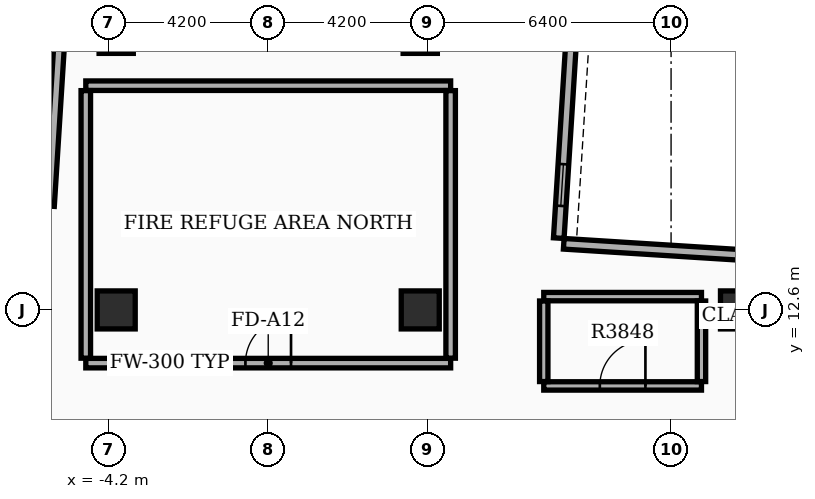
"""IFC4 building model, lengths in metres.
Left out: names, types, materials, properties, quantities, classifications, styles, units other than length and angle.
Written with IfcOpenShell. Run it as: python <this file> out.ifc"""

import sys

from ifc_helpers import new_model, si_unit, direction, frame, frame_2d, origin, origin_2d, place, context, subcontext, project, spatial, rectangle, extrude, element, fill, save


model = new_model("IFC4")
c1 = context("Model", 3, precision=1e-05, world=origin(), true_north=direction((0.0, 1.0)))
c2 = subcontext(c1, "Body", "Model", "MODEL_VIEW")
j1 = project(units=[si_unit("LENGTHUNIT", "METRE"), si_unit("PLANEANGLEUNIT", "RADIAN")], contexts=[c1])
p1 = place(None, origin())
s1 = spatial("IfcSite", under=j1, at=p1, CompositionType="ELEMENT")
p2 = place(p1, origin())
s2 = spatial("IfcBuilding", under=s1, at=p2, CompositionType="ELEMENT")
p3 = place(p2, frame((0.0, 0.0, 240.3)))
s3 = spatial("IfcBuildingStorey", under=s2, at=p3, CompositionType="ELEMENT", Elevation=240.3)
for number, where, z_axis, x_axis in (
    (1, (12.4, 12.6, 0.0), (0.0, 0.0, 1.0), (1.0, 0.0, 0.0)),
    (2, (4.0, 12.6, 0.0), (0.0, 0.0, 1.0), (1.0, 0.0, 0.0)),
    (3, (-4.0, 12.6, 0.0), (0.0, 0.0, 1.0), (1.0, 0.0, 0.0)),
):
    element("IfcColumn", number, at=place(p3, frame(where, z_axis=z_axis, x_axis=x_axis)), inside=s3, PredefinedType="COLUMN", context=c2, shape_type="SweptSolid", body=[
        extrude(rectangle(XDim=1.0, YDim=1.0, at=origin_2d()), origin(), (0.0, 0.0, 1.0), 5.1),
    ])
for number, where, z_axis, x_axis in (
    (4, (-4.0, 19.8, 0.0), (0.0, 0.0, 1.0), (1.0, 0.0, 0.0)),
    (5, (4.0, 19.8, 0.0), (0.0, 0.0, 1.0), (1.0, 0.0, 0.0)),
):
    element("IfcColumn", number, at=place(p3, frame(where, z_axis=z_axis, x_axis=x_axis)), inside=s3, PredefinedType="COLUMN", context=c2, shape_type="SweptSolid", body=[
        extrude(rectangle(XDim=0.9, YDim=0.9, at=origin_2d()), origin(), (0.0, 0.0, 1.0), 5.1),
    ])
p4 = place(p3, frame((7.645, 14.489, 0.0), z_axis=(0.0, 0.0, 1.0), x_axis=(0.06279645424, 0.99802635503, 0.0)))
e6 = element("IfcWall", 6, at=p4, inside=s3, PredefinedType="STANDARD", context=c2, shape_type="SweptSolid", body=[
    extrude(rectangle(XDim=20.1, YDim=0.28, at=frame_2d((10.05, 0.0))), origin(), (0.0, 0.0, 1.0), 3.93),
])
p5 = place(p4, frame((0.85, 0.0, 0.95)))
e7 = element("IfcOpeningElement", 7, at=p5, cuts=e6, PredefinedType="OPENING", context=c2, shape_type="SweptSolid", body=[
    extrude(rectangle(XDim=1.1, YDim=1.2, at=frame_2d((0.55, 0.6))), frame((0.0, 0.15, 0.0), z_axis=(0.0, -1.0, 0.0), x_axis=(1.0, 0.0, 0.0)), (0.0, 0.0, 1.0), 0.3),
])
p6 = place(p3, frame((-4.507, 35.393, 0.0), z_axis=(0.0, 0.0, 1.0), x_axis=(-0.062784355807, -0.998027116198, 0.0)))
e8 = element("IfcWall", 8, at=p6, inside=s3, PredefinedType="STANDARD", context=c2, shape_type="SweptSolid", body=[
    extrude(rectangle(XDim=20.1, YDim=0.28, at=frame_2d((10.05, 0.0))), origin(), (0.0, 0.0, 1.0), 3.93),
])
p7 = place(p6, frame((0.85, 0.0, 0.95)))
e9 = element("IfcOpeningElement", 9, at=p7, cuts=e8, PredefinedType="OPENING", context=c2, shape_type="SweptSolid", body=[
    extrude(rectangle(XDim=1.1, YDim=1.2, at=frame_2d((0.55, 0.6))), frame((0.0, 0.15, 0.0), z_axis=(0.0, -1.0, 0.0), x_axis=(1.0, 0.0, 0.0)), (0.0, 0.0, 1.0), 0.3),
])
p8 = place(p3, frame((14.063, 13.945, 0.0), z_axis=(0.0, 0.0, 1.0), x_axis=(-0.998027314704, 0.062781200242, 0.0)))
e10 = element("IfcWall", 10, at=p8, inside=s3, PredefinedType="STANDARD", context=c2, shape_type="SweptSolid", body=[
    extrude(rectangle(XDim=6.3, YDim=0.28, at=frame_2d((3.15, 0.0))), origin(), (0.0, 0.0, 1.0), 3.93),
])
p9 = place(p3, frame((-4.8, 11.2, 0.0), z_axis=(0.0, 0.0, 1.0), x_axis=(1.0, 0.0, 0.0)))
e11 = element("IfcWall", 11, at=p9, inside=s3, PredefinedType="SOLIDWALL", context=c2, shape_type="SweptSolid", body=[
    extrude(rectangle(XDim=9.6, YDim=0.25, at=frame_2d((4.8, 0.0))), origin(), (0.0, 0.0, 1.0), 3.92),
])
p10 = place(p9, frame((4.2, 0.0, 0.0)))
e12 = element("IfcOpeningElement", 12, at=p10, cuts=e11, PredefinedType="OPENING", context=c2, shape_type="SweptSolid", body=[
    extrude(rectangle(XDim=1.2, YDim=2.15, at=frame_2d((0.6, 1.075))), frame((0.0, 0.135, 0.0), z_axis=(0.0, -1.0, 0.0), x_axis=(1.0, 0.0, 0.0)), (0.0, 0.0, 1.0), 0.27),
])
p11 = place(p3, frame((-4.8, 18.5, 0.0), z_axis=(0.0, 0.0, 1.0), x_axis=(1.0, 0.0, 0.0)))
e13 = element("IfcWall", 13, at=p11, inside=s3, PredefinedType="SOLIDWALL", context=c2, shape_type="SweptSolid", body=[
    extrude(rectangle(XDim=9.6, YDim=0.25, at=frame_2d((4.8, 0.0))), origin(), (0.0, 0.0, 1.0), 3.92),
])
for number, where, z_axis, x_axis in (
    (14, (-4.8, 11.33, 0.0), (0.0, 0.0, 1.0), (0.0, 1.0, 0.0)),
    (15, (4.8, 11.33, 0.0), (0.0, 0.0, 1.0), (0.0, 1.0, 0.0)),
):
    element("IfcWall", number, at=place(p3, frame(where, z_axis=z_axis, x_axis=x_axis)), inside=s3, PredefinedType="SOLIDWALL", context=c2, shape_type="SweptSolid", body=[
        extrude(rectangle(XDim=7.04, YDim=0.25, at=frame_2d((3.52, 0.0))), origin(), (0.0, 0.0, 1.0), 3.92),
    ])
p12 = place(p3, frame((7.25, 10.6, 0.0), z_axis=(0.0, 0.0, 1.0), x_axis=(1.0, 0.0, 0.0)))
e16 = element("IfcWall", 16, at=p12, inside=s3, PredefinedType="PARTITIONING", context=c2, shape_type="SweptSolid", body=[
    extrude(rectangle(XDim=4.15, YDim=0.22, at=frame_2d((2.075, 0.0))), origin(), (0.0, 0.0, 1.0), 3.92),
])
p13 = place(p12, frame((1.475, 0.0, 0.0)))
e17 = element("IfcOpeningElement", 17, at=p13, cuts=e16, PredefinedType="OPENING", context=c2, shape_type="SweptSolid", body=[
    extrude(rectangle(XDim=1.2, YDim=2.15, at=frame_2d((0.6, 1.075))), frame((0.0, 0.12, 0.0), z_axis=(0.0, -1.0, 0.0), x_axis=(1.0, 0.0, 0.0)), (0.0, 0.0, 1.0), 0.24),
])
p14 = place(p3, frame((7.25, 12.95, 0.0), z_axis=(0.0, 0.0, 1.0), x_axis=(1.0, 0.0, 0.0)))
e18 = element("IfcWall", 18, at=p14, inside=s3, PredefinedType="PARTITIONING", context=c2, shape_type="SweptSolid", body=[
    extrude(rectangle(XDim=4.15, YDim=0.22, at=frame_2d((2.075, 0.0))), origin(), (0.0, 0.0, 1.0), 3.92),
])
for number, where, z_axis, x_axis in (
    (19, (7.25, 10.715, 0.0), (0.0, 0.0, 1.0), (0.0, 1.0, 0.0)),
    (20, (11.4, 10.715, 0.0), (0.0, 0.0, 1.0), (0.0, 1.0, 0.0)),
):
    element("IfcWall", number, at=place(p3, frame(where, z_axis=z_axis, x_axis=x_axis)), inside=s3, PredefinedType="PARTITIONING", context=c2, shape_type="SweptSolid", body=[
        extrude(rectangle(XDim=2.12, YDim=0.22, at=frame_2d((1.06, 0.0))), origin(), (0.0, 0.0, 1.0), 3.92),
    ])
p15 = place(p5, origin())
e21 = element("IfcWindow", 21, at=p15, inside=s3, PartitioningType="SINGLE_PANEL", PredefinedType="WINDOW", context=c2, shape_type="SweptSolid", body=[
    extrude(rectangle(XDim=1.1, YDim=1.2, at=frame_2d((0.55, 0.6))), frame((0.0, 0.03, 0.0), z_axis=(0.0, -1.0, 0.0), x_axis=(1.0, 0.0, 0.0)), (0.0, 0.0, 1.0), 0.06),
])
fill(e7, e21)
p16 = place(p10, origin())
e22 = element("IfcDoor", 22, at=p16, inside=s3, OperationType="SINGLE_SWING_RIGHT", PredefinedType="DOOR", context=c2, shape_type="SweptSolid", body=[
    extrude(rectangle(XDim=1.2, YDim=2.15, at=frame_2d((0.6, 1.075))), frame((0.0, 0.025, 0.0), z_axis=(0.0, -1.0, 0.0), x_axis=(1.0, 0.0, 0.0)), (0.0, 0.0, 1.0), 0.05),
])
fill(e12, e22)
p17 = place(p13, origin())
e23 = element("IfcDoor", 23, at=p17, inside=s3, OperationType="SINGLE_SWING_RIGHT", PredefinedType="DOOR", context=c2, shape_type="SweptSolid", body=[
    extrude(rectangle(XDim=1.2, YDim=2.15, at=frame_2d((0.6, 1.075))), frame((0.0, 0.025, 0.0), z_axis=(0.0, -1.0, 0.0), x_axis=(1.0, 0.0, 0.0)), (0.0, 0.0, 1.0), 0.05),
])
fill(e17, e23)
save(model, sys.argv[1])
